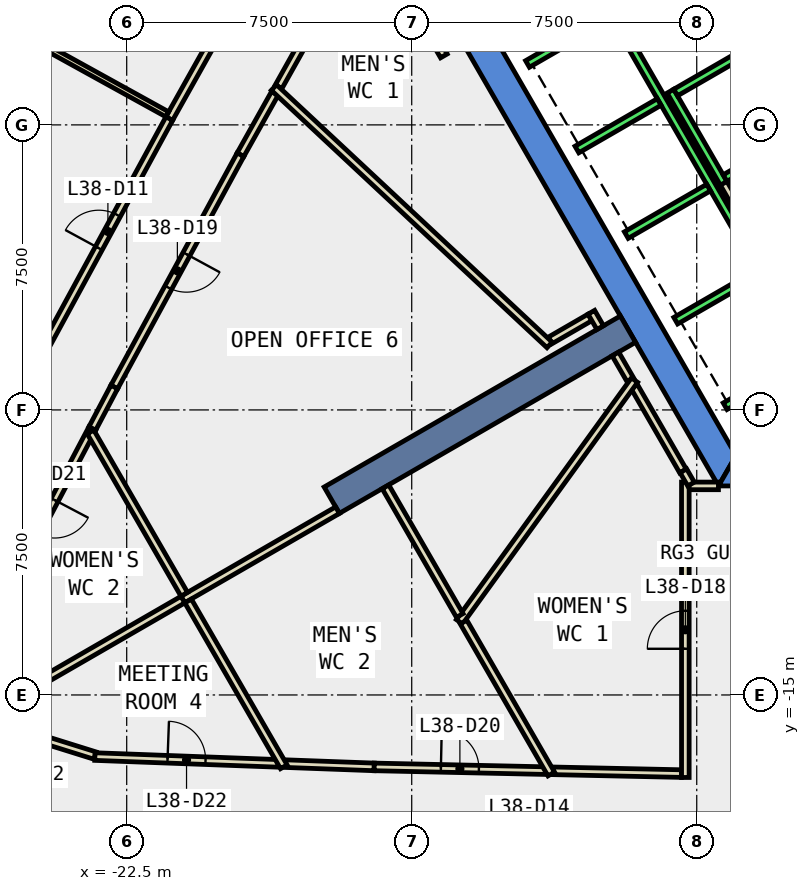
"""IFC4 building model, lengths in metres.
Left out: names, types, materials, properties, quantities, classifications, styles, units other than length and angle.
Written with IfcOpenShell. Run it as: python <this file> out.ifc"""

import sys

from ifc_helpers import new_model, si_unit, direction, frame, frame_2d, origin, place, context, subcontext, project, spatial, polyline, rectangle, outline, extrude, element, fill, save


model = new_model("IFC4")
c1 = context("Model", 3, precision=1e-05, world=origin(), true_north=direction((0.0, 1.0)))
c2 = subcontext(c1, "Body", "Model", "MODEL_VIEW")
j1 = project(units=[si_unit("LENGTHUNIT", "METRE"), si_unit("PLANEANGLEUNIT", "RADIAN")], contexts=[c1])
p1 = place(None, origin())
s1 = spatial("IfcSite", under=j1, at=p1, CompositionType="ELEMENT")
p2 = place(p1, origin())
s2 = spatial("IfcBuilding", under=s1, at=p2, CompositionType="ELEMENT")
p3 = place(p2, frame((0.0, 0.0, 171.8)))
s3 = spatial("IfcBuildingStorey", under=s2, at=p3, CompositionType="ELEMENT", Elevation=171.8)
p4 = place(p3, frame((0.0, 0.0, -0.4)))
e1 = element("IfcWall", 1, at=p4, inside=s3, PredefinedType="SHEAR", context=c2, shape_type="SweptSolid", body=[
    extrude(outline(polyline([(-13.856, 2.5), (-6.928, -9.5), (-6.466, -8.7), (-12.933, 2.5), (-13.856, 2.5)])), origin(), (0.0, 0.0, 1.0), 4.2),
])
p5 = place(p3, frame((0.0, 0.0, -0.4)))
e2 = element("IfcWall", 2, at=p5, inside=s3, PredefinedType="SHEAR", context=c2, shape_type="SweptSolid", body=[
    extrude(outline(polyline([(3.75, -9.5), (3.75, -8.7), (-6.466, -8.7), (-6.928, -9.5), (3.75, -9.5)])), origin(), (0.0, 0.0, 1.0), 4.2),
])
p6 = place(p3, frame((-9.31, -5.375, -0.4), z_axis=(0.0, 0.0, 1.0), x_axis=(-0.866017533419, -0.500013631625, 0.0)))
e3 = element("IfcWall", 3, at=p6, inside=s3, PredefinedType="SHEAR", context=c2, shape_type="SweptSolid", body=[
    extrude(rectangle(XDim=9.0, YDim=0.8, at=frame_2d((4.5, 0.0))), origin(), (0.0, 0.0, 1.0), 4.2),
])
p7 = place(p3, frame((-14.154, 1.815, 0.0), z_axis=(0.0, 0.0, 1.0), x_axis=(-0.500038857296, 0.866002968352, 0.0)))
e4 = element("IfcWall", 4, at=p7, inside=s3, PredefinedType="PARTITIONING", context=c2, shape_type="SweptSolid", body=[
    extrude(rectangle(XDim=3.34, YDim=0.2, at=frame_2d((1.67, 0.0))), origin(), (0.0, 0.0, 1.0), 3.8),
])
p8 = place(p3, frame((-16.255, 5.014, 0.0), z_axis=(0.0, 0.0, 1.0), x_axis=(-0.488988017817, -0.87229050117, 0.0)))
e5 = element("IfcWall", 5, at=p8, inside=s3, PredefinedType="PARTITIONING", context=c2, shape_type="SweptSolid", body=[
    extrude(rectangle(XDim=4.599, YDim=0.2, at=frame_2d((2.3, 0.0))), origin(), (0.0, 0.0, 1.0), 3.8),
])
p9 = place(p8, frame((1.8, 0.0, 0.0)))
e6 = element("IfcOpeningElement", 6, at=p9, cuts=e5, PredefinedType="OPENING", context=c2, shape_type="SweptSolid", body=[
    extrude(rectangle(XDim=1.0, YDim=2.1, at=frame_2d((0.5, 1.05))), frame((0.0, 0.11, 0.0), z_axis=(0.0, -1.0, 0.0), x_axis=(1.0, 0.0, 0.0)), (0.0, 0.0, 1.0), 0.22),
])
p10 = place(p3, frame((-11.278, -16.996, 0.0), z_axis=(0.0, 0.0, 1.0), x_axis=(0.999766613119, -0.021603687022, 0.0)))
e7 = element("IfcWall", 7, at=p10, inside=s3, PredefinedType="PARTITIONING", context=c2, shape_type="SweptSolid", body=[
    extrude(rectangle(XDim=3.379, YDim=0.2, at=frame_2d((1.689, 0.0))), origin(), (0.0, 0.0, 1.0), 3.8),
])
p11 = place(p3, frame((-18.602, 0.828, 0.0), z_axis=(0.0, 0.0, 1.0), x_axis=(-0.488969229043, -0.872301033502, 0.0)))
e8 = element("IfcWall", 8, at=p11, inside=s3, PredefinedType="PARTITIONING", context=c2, shape_type="SweptSolid", body=[
    extrude(rectangle(XDim=1.849, YDim=0.2, at=frame_2d((0.924, 0.0))), origin(), (0.0, 0.0, 1.0), 3.8),
])
p12 = place(p3, frame((-19.506, -0.785, 0.0), z_axis=(0.0, 0.0, 1.0), x_axis=(-0.477513909405, -0.878624189472, 0.0)))
e9 = element("IfcWall", 9, at=p12, inside=s3, PredefinedType="PARTITIONING", context=c2, shape_type="SweptSolid", body=[
    extrude(rectangle(XDim=6.956, YDim=0.2, at=frame_2d((3.478, 0.0))), origin(), (0.0, 0.0, 1.0), 3.8),
])
p13 = place(p12, frame((2.978, 0.0, 0.0)))
e10 = element("IfcOpeningElement", 10, at=p13, cuts=e9, PredefinedType="OPENING", context=c2, shape_type="SweptSolid", body=[
    extrude(rectangle(XDim=1.0, YDim=2.1, at=frame_2d((0.5, 1.05))), frame((0.0, 0.11, 0.0), z_axis=(0.0, -1.0, 0.0), x_axis=(1.0, 0.0, 0.0)), (0.0, 0.0, 1.0), 0.22),
])
p14 = place(p3, frame((-22.828, -6.897, 0.0), z_axis=(0.0, 0.0, 1.0), x_axis=(-0.467225806893, -0.884138023938, 0.0)))
e11 = element("IfcWall", 11, at=p14, inside=s3, PredefinedType="PARTITIONING", context=c2, shape_type="SweptSolid", body=[
    extrude(rectangle(XDim=1.237, YDim=0.2, at=frame_2d((0.619, 0.0))), origin(), (0.0, 0.0, 1.0), 3.8),
])
p15 = place(p3, frame((-18.316, -16.807, 0.0), z_axis=(0.0, 0.0, 1.0), x_axis=(0.999315981353, -0.036980662692, 0.0)))
e12 = element("IfcWall", 12, at=p15, inside=s3, PredefinedType="PARTITIONING", context=c2, shape_type="SweptSolid", body=[
    extrude(rectangle(XDim=2.331, YDim=0.2, at=frame_2d((1.165, 0.0))), origin(), (0.0, 0.0, 1.0), 3.8),
])
p16 = place(p3, frame((-15.987, -16.893, 0.0), z_axis=(0.0, 0.0, 1.0), x_axis=(0.999764376572, -0.021706942174, 0.0)))
e13 = element("IfcWall", 13, at=p16, inside=s3, PredefinedType="PARTITIONING", context=c2, shape_type="SweptSolid", body=[
    extrude(rectangle(XDim=4.51, YDim=0.2, at=frame_2d((2.255, 0.0))), origin(), (0.0, 0.0, 1.0), 3.8),
])
p17 = place(p16, frame((1.755, 0.0, 0.0)))
e14 = element("IfcOpeningElement", 14, at=p17, cuts=e13, PredefinedType="OPENING", context=c2, shape_type="SweptSolid", body=[
    extrude(rectangle(XDim=1.0, YDim=2.1, at=frame_2d((0.5, 1.05))), frame((0.0, 0.11, 0.0), z_axis=(0.0, -1.0, 0.0), x_axis=(1.0, 0.0, 0.0)), (0.0, 0.0, 1.0), 0.22),
])
p18 = place(p3, frame((-23.406, -7.991, 0.0), z_axis=(0.0, 0.0, 1.0), x_axis=(-0.466307932558, -0.884622468646, 0.0)))
e15 = element("IfcWall", 15, at=p18, inside=s3, PredefinedType="PARTITIONING", context=c2, shape_type="SweptSolid", body=[
    extrude(rectangle(XDim=5.25, YDim=0.2, at=frame_2d((2.625, 0.0))), origin(), (0.0, 0.0, 1.0), 3.8),
])
p19 = place(p18, frame((2.125, 0.0, 0.0)))
e16 = element("IfcOpeningElement", 16, at=p19, cuts=e15, PredefinedType="OPENING", context=c2, shape_type="SweptSolid", body=[
    extrude(rectangle(XDim=1.0, YDim=2.1, at=frame_2d((0.5, 1.05))), frame((0.0, 0.11, 0.0), z_axis=(0.0, -1.0, 0.0), x_axis=(1.0, 0.0, 0.0)), (0.0, 0.0, 1.0), 0.22),
])
p20 = place(p3, frame((-25.645, -15.873, 0.0), z_axis=(0.0, 0.0, 1.0), x_axis=(0.95454810771, -0.298056890655, 0.0)))
e17 = element("IfcWall", 17, at=p20, inside=s3, PredefinedType="PARTITIONING", context=c2, shape_type="SweptSolid", body=[
    extrude(rectangle(XDim=2.422, YDim=0.2, at=frame_2d((1.211, 0.0))), origin(), (0.0, 0.0, 1.0), 3.8),
])
p21 = place(p3, frame((-23.337, -16.621, 0.0), z_axis=(0.0, 0.0, 1.0), x_axis=(0.999311710526, -0.037095892019, 0.0)))
e18 = element("IfcWall", 18, at=p21, inside=s3, PredefinedType="PARTITIONING", context=c2, shape_type="SweptSolid", body=[
    extrude(rectangle(XDim=4.824, YDim=0.2, at=frame_2d((2.412, 0.0))), origin(), (0.0, 0.0, 1.0), 3.8),
])
p22 = place(p21, frame((1.913, 0.0, 0.0)))
e19 = element("IfcOpeningElement", 19, at=p22, cuts=e18, PredefinedType="OPENING", context=c2, shape_type="SweptSolid", body=[
    extrude(rectangle(XDim=1.0, YDim=2.1, at=frame_2d((0.5, 1.05))), frame((0.0, 0.11, 0.0), z_axis=(0.0, -1.0, 0.0), x_axis=(1.0, 0.0, 0.0)), (0.0, 0.0, 1.0), 0.22),
])
p23 = place(p3, frame((-21.381, 0.165, 0.0), z_axis=(0.0, 0.0, 1.0), x_axis=(0.489014139272, 0.872275857509, 0.0)))
e20 = element("IfcWall", 20, at=p23, inside=s3, PredefinedType="PARTITIONING", context=c2, shape_type="SweptSolid", body=[
    extrude(rectangle(XDim=7.057, YDim=0.2, at=frame_2d((3.529, 0.0))), origin(), (0.0, 0.0, 1.0), 3.8),
])
p24 = place(p23, frame((3.029, 0.0, 0.0)))
e21 = element("IfcOpeningElement", 21, at=p24, cuts=e20, PredefinedType="OPENING", context=c2, shape_type="SweptSolid", body=[
    extrude(rectangle(XDim=1.0, YDim=2.1, at=frame_2d((0.5, 1.05))), frame((0.0, 0.11, 0.0), z_axis=(0.0, -1.0, 0.0), x_axis=(1.0, 0.0, 0.0)), (0.0, 0.0, 1.0), 0.22),
])
p25 = place(p3, frame((-24.68, -5.906, 0.0), z_axis=(0.0, 0.0, 1.0), x_axis=(0.47757676389, 0.878590026459, 0.0)))
e22 = element("IfcWall", 22, at=p25, inside=s3, PredefinedType="PARTITIONING", context=c2, shape_type="SweptSolid", body=[
    extrude(rectangle(XDim=6.91, YDim=0.2, at=frame_2d((3.455, 0.0))), origin(), (0.0, 0.0, 1.0), 3.8),
])
p26 = place(p25, frame((3.029, 0.0, 0.0)))
e23 = element("IfcOpeningElement", 23, at=p26, cuts=e22, PredefinedType="OPENING", context=c2, shape_type="SweptSolid", body=[
    extrude(rectangle(XDim=1.0, YDim=2.1, at=frame_2d((0.5, 1.05))), frame((0.0, 0.11, 0.0), z_axis=(0.0, -1.0, 0.0), x_axis=(1.0, 0.0, 0.0)), (0.0, 0.0, 1.0), 0.22),
])
p27 = place(p3, frame((-23.691, -18.683, 0.0), z_axis=(0.0, 0.0, 1.0), x_axis=(-0.954546657381, 0.298061535398, 0.0)))
e24 = element("IfcWall", 24, at=p27, inside=s3, PredefinedType="PARTITIONING", context=c2, shape_type="SweptSolid", body=[
    extrude(rectangle(XDim=3.191, YDim=0.2, at=frame_2d((1.596, 0.0))), origin(), (0.0, 0.0, 1.0), 3.8),
])
p28 = place(p27, frame((1.096, 0.0, 0.0)))
e25 = element("IfcOpeningElement", 25, at=p28, cuts=e24, PredefinedType="OPENING", context=c2, shape_type="SweptSolid", body=[
    extrude(rectangle(XDim=1.0, YDim=2.1, at=frame_2d((0.5, 1.05))), frame((0.0, 0.11, 0.0), z_axis=(0.0, -1.0, 0.0), x_axis=(1.0, 0.0, 0.0)), (0.0, 0.0, 1.0), 0.22),
])
p29 = place(p3, frame((-5.492, -3.788, 0.0), z_axis=(0.0, 0.0, 1.0), x_axis=(-0.500008949224, 0.866020236886, 0.0)))
e26 = element("IfcWall", 26, at=p29, inside=s3, PredefinedType="PARTITIONING", context=c2, shape_type="SweptSolid", body=[
    extrude(rectangle(XDim=2.68, YDim=0.2, at=frame_2d((1.34, 0.0))), origin(), (0.0, 0.0, 1.0), 3.8),
])
p30 = place(p3, frame((-7.722, -9.499, 0.0), z_axis=(0.0, 0.0, 1.0), x_axis=(1.0, 0.0, 0.0)))
e27 = element("IfcWall", 27, at=p30, inside=s3, PredefinedType="PARTITIONING", context=c2, shape_type="SweptSolid", body=[
    extrude(rectangle(XDim=0.793, YDim=0.2, at=frame_2d((0.396, 0.0))), origin(), (0.0, 0.0, 1.0), 3.8),
])
p31 = place(p3, frame((-7.8, -17.171, 0.0), z_axis=(0.0, 0.0, 1.0), x_axis=(0.0, 1.0, 0.0)))
e28 = element("IfcWall", 28, at=p31, inside=s3, PredefinedType="PARTITIONING", context=c2, shape_type="SweptSolid", body=[
    extrude(rectangle(XDim=7.772, YDim=0.2, at=frame_2d((3.886, 0.0))), origin(), (0.0, 0.0, 1.0), 3.8),
])
p32 = place(p31, frame((3.386, 0.0, 0.0)))
e29 = element("IfcOpeningElement", 29, at=p32, cuts=e28, PredefinedType="OPENING", context=c2, shape_type="SweptSolid", body=[
    extrude(rectangle(XDim=1.0, YDim=2.1, at=frame_2d((0.5, 1.05))), frame((0.0, 0.11, 0.0), z_axis=(0.0, -1.0, 0.0), x_axis=(1.0, 0.0, 0.0)), (0.0, 0.0, 1.0), 0.22),
])
p33 = place(p3, frame((-7.862, -9.107, 0.0), z_axis=(0.0, 0.0, 1.0), x_axis=(-0.499994038704, 0.866028845513, 0.0)))
e30 = element("IfcWall", 30, at=p33, inside=s3, PredefinedType="PARTITIONING", context=c2, shape_type="SweptSolid", body=[
    extrude(rectangle(XDim=2.568, YDim=0.2, at=frame_2d((1.284, 0.0))), origin(), (0.0, 0.0, 1.0), 3.8),
])
p34 = place(p3, frame((-7.65, -9.451, 0.0), z_axis=(0.0, 0.0, 1.0), x_axis=(-0.500297731093, 0.865853440406, 0.0)))
e31 = element("IfcWall", 31, at=p34, inside=s3, PredefinedType="PARTITIONING", context=c2, shape_type="SweptSolid", body=[
    extrude(rectangle(XDim=0.404, YDim=0.2, at=frame_2d((0.202, 0.0))), origin(), (0.0, 0.0, 1.0), 3.8),
])
p35 = place(p3, frame((-9.246, -6.71, 0.0), z_axis=(0.0, 0.0, 1.0), x_axis=(-0.499570510076, 0.86627322795, 0.0)))
e32 = element("IfcWall", 32, at=p35, inside=s3, PredefinedType="PARTITIONING", context=c2, shape_type="SweptSolid", body=[
    extrude(rectangle(XDim=0.788, YDim=0.2, at=frame_2d((0.394, 0.0))), origin(), (0.0, 0.0, 1.0), 3.8),
])
p36 = place(p3, frame((-10.31, -5.066, 0.0), z_axis=(0.0, 0.0, 1.0), x_axis=(-0.865587329375, -0.500758000661, 0.0)))
e33 = element("IfcWall", 33, at=p36, inside=s3, PredefinedType="PARTITIONING", context=c2, shape_type="SweptSolid", body=[
    extrude(rectangle(XDim=1.21, YDim=0.2, at=frame_2d((0.605, 0.0))), origin(), (0.0, 0.0, 1.0), 3.8),
])
p37 = place(p3, frame((-11.372, -5.79, 0.0), z_axis=(0.0, 0.0, 1.0), x_axis=(-0.730922728623, 0.682460229451, 0.0)))
e34 = element("IfcWall", 34, at=p37, inside=s3, PredefinedType="PARTITIONING", context=c2, shape_type="SweptSolid", body=[
    extrude(rectangle(XDim=9.924, YDim=0.2, at=frame_2d((4.962, 0.0))), origin(), (0.0, 0.0, 1.0), 3.8),
])
p38 = place(p3, frame((-13.744, -13.076, 0.0), z_axis=(0.0, 0.0, 1.0), x_axis=(0.586577314901, 0.809893235953, 0.0)))
e35 = element("IfcWall", 35, at=p38, inside=s3, PredefinedType="PARTITIONING", context=c2, shape_type="SweptSolid", body=[
    extrude(rectangle(XDim=7.854, YDim=0.2, at=frame_2d((3.927, 0.0))), origin(), (0.0, 0.0, 1.0), 3.8),
])
p39 = place(p3, frame((-11.328, -17.08, 0.0), z_axis=(0.0, 0.0, 1.0), x_axis=(-0.499972710878, 0.866041158593, 0.0)))
e36 = element("IfcWall", 36, at=p39, inside=s3, PredefinedType="PARTITIONING", context=c2, shape_type="SweptSolid", body=[
    extrude(rectangle(XDim=4.616, YDim=0.2, at=frame_2d((2.308, 0.0))), origin(), (0.0, 0.0, 1.0), 3.8),
])
p40 = place(p3, frame((-13.736, -12.909, 0.0), z_axis=(0.0, 0.0, 1.0), x_axis=(-0.49990810406, 0.866078453429, 0.0)))
e37 = element("IfcWall", 37, at=p40, inside=s3, PredefinedType="PARTITIONING", context=c2, shape_type="SweptSolid", body=[
    extrude(rectangle(XDim=3.908, YDim=0.2, at=frame_2d((1.954, 0.0))), origin(), (0.0, 0.0, 1.0), 3.8),
])
p41 = place(p3, frame((-16.952, -10.138, 0.0), z_axis=(0.0, 0.0, 1.0), x_axis=(-0.866054992606, -0.499948747156, 0.0)))
e38 = element("IfcWall", 38, at=p41, inside=s3, PredefinedType="PARTITIONING", context=c2, shape_type="SweptSolid", body=[
    extrude(rectangle(XDim=4.701, YDim=0.2, at=frame_2d((2.35, 0.0))), origin(), (0.0, 0.0, 1.0), 3.8),
])
p42 = place(p3, frame((-20.986, -12.351, 0.0), z_axis=(0.0, 0.0, 1.0), x_axis=(-0.499993851206, 0.866028953763, 0.0)))
e39 = element("IfcWall", 39, at=p42, inside=s3, PredefinedType="PARTITIONING", context=c2, shape_type="SweptSolid", body=[
    extrude(rectangle(XDim=4.932, YDim=0.2, at=frame_2d((2.466, 0.0))), origin(), (0.0, 0.0, 1.0), 3.8),
])
p43 = place(p3, frame((-18.366, -16.89, 0.0), z_axis=(0.0, 0.0, 1.0), x_axis=(-0.499965828395, 0.866045131871, 0.0)))
e40 = element("IfcWall", 40, at=p43, inside=s3, PredefinedType="PARTITIONING", context=c2, shape_type="SweptSolid", body=[
    extrude(rectangle(XDim=5.036, YDim=0.2, at=frame_2d((2.518, 0.0))), origin(), (0.0, 0.0, 1.0), 3.8),
])
p44 = place(p3, frame((-21.021, -12.491, 0.0), z_axis=(0.0, 0.0, 1.0), x_axis=(-0.865966890845, -0.500101333692, 0.0)))
e41 = element("IfcWall", 41, at=p44, inside=s3, PredefinedType="PARTITIONING", context=c2, shape_type="SweptSolid", body=[
    extrude(rectangle(XDim=5.931, YDim=0.2, at=frame_2d((2.965, 0.0))), origin(), (0.0, 0.0, 1.0), 3.8),
])
p45 = place(p3, frame((-21.432, 0.278, 0.0), z_axis=(0.0, 0.0, 1.0), x_axis=(-0.875412579047, 0.483376474857, 0.0)))
e42 = element("IfcWall", 42, at=p45, inside=s3, PredefinedType="PARTITIONING", context=c2, shape_type="SweptSolid", body=[
    extrude(rectangle(XDim=4.531, YDim=0.15, at=frame_2d((2.265, 0.0))), origin(), (0.0, 0.0, 1.0), 3.8),
])
p46 = place(p3, frame((-10.04, -5.334, 0.0), z_axis=(0.0, 0.0, 1.0), x_axis=(-0.499405191234, 0.86636854454, 0.0)))
e43 = element("IfcWall", 43, at=p46, inside=s3, PredefinedType="PARTITIONING", context=c2, shape_type="SweptSolid", body=[
    extrude(rectangle(XDim=0.466, YDim=0.2, at=frame_2d((0.233, 0.0))), origin(), (0.0, 0.0, 1.0), 3.8),
])
p47 = place(p3, frame((-8.192, 0.888, 0.0), z_axis=(0.0, 0.0, 1.0), x_axis=(0.49994636267, -0.866056369097, 0.0)))
e44 = element("IfcWall", 44, at=p47, inside=s3, PredefinedType="STANDARD", context=c2, shape_type="SweptSolid", body=[
    extrude(rectangle(XDim=2.8, YDim=0.2, at=frame_2d((1.4, 0.0))), origin(), (0.0, 0.0, 1.0), 3.8),
])
for number, where, z_axis, x_axis in (
    (45, (-5.977, 2.052, 0.0), (0.0, 0.0, 1.0), (-0.866, -0.5, 0.0)),
    (46, (-4.677, -0.2, 0.0), (0.0, 0.0, 1.0), (-0.866, -0.5, 0.0)),
):
    element("IfcWall", number, at=place(p3, frame(where, z_axis=z_axis, x_axis=x_axis)), inside=s3, PredefinedType="STANDARD", context=c2, shape_type="SweptSolid", body=[
        extrude(rectangle(XDim=2.399, YDim=0.2, at=frame_2d((1.2, 0.0))), origin(), (0.0, 0.0, 1.0), 3.8),
    ])
p48 = place(p3, frame((-9.751, 2.99, 0.0), z_axis=(0.0, 0.0, 1.0), x_axis=(0.50000090737, -0.866024879913, 0.0)))
e47 = element("IfcWall", 47, at=p48, inside=s3, PredefinedType="STANDARD", context=c2, shape_type="SweptSolid", body=[
    extrude(rectangle(XDim=10.6, YDim=0.2, at=frame_2d((5.3, 0.0))), origin(), (0.0, 0.0, 1.0), 3.8),
])
p49 = place(p3, frame((-9.788, 2.853, 0.0), z_axis=(0.0, 0.0, 1.0), x_axis=(-0.865998541277, -0.500046524342, 0.0)))
e48 = element("IfcWall", 48, at=p49, inside=s3, PredefinedType="STANDARD", context=c2, shape_type="SweptSolid", body=[
    extrude(rectangle(XDim=2.5, YDim=0.2, at=frame_2d((1.25, 0.0))), origin(), (0.0, 0.0, 1.0), 3.8),
])
for number, where, z_axis, x_axis in (
    (49, (-8.488, 0.602, 0.0), (0.0, 0.0, 1.0), (-0.866, -0.5, 0.0)),
    (50, (-7.188, -1.65, 0.0), (0.0, 0.0, 1.0), (-0.866, -0.5, 0.0)),
    (51, (-5.888, -3.902, 0.0), (0.0, 0.0, 1.0), (-0.866, -0.5, 0.0)),
    (52, (-4.588, -6.153, 0.0), (0.0, 0.0, 1.0), (-0.866, -0.5, 0.0)),
):
    element("IfcWall", number, at=place(p3, frame(where, z_axis=z_axis, x_axis=x_axis)), inside=s3, PredefinedType="STANDARD", context=c2, shape_type="SweptSolid", body=[
        extrude(rectangle(XDim=2.5, YDim=0.2, at=frame_2d((1.25, 0.0))), origin(), (0.0, 0.0, 1.0), 3.8),
    ])
p50 = place(p26, origin())
e53 = element("IfcDoor", 53, at=p50, inside=s3, OperationType="SINGLE_SWING_LEFT", PredefinedType="DOOR", context=c2, shape_type="SweptSolid", body=[
    extrude(rectangle(XDim=1.0, YDim=2.1, at=frame_2d((0.5, 1.05))), frame((0.0, 0.025, 0.0), z_axis=(0.0, -1.0, 0.0), x_axis=(1.0, 0.0, 0.0)), (0.0, 0.0, 1.0), 0.05),
])
fill(e23, e53)
p51 = place(p32, origin())
e54 = element("IfcDoor", 54, at=p51, inside=s3, OperationType="SINGLE_SWING_LEFT", PredefinedType="DOOR", context=c2, shape_type="SweptSolid", body=[
    extrude(rectangle(XDim=1.0, YDim=2.1, at=frame_2d((0.5, 1.05))), frame((0.0, 0.025, 0.0), z_axis=(0.0, -1.0, 0.0), x_axis=(1.0, 0.0, 0.0)), (0.0, 0.0, 1.0), 0.05),
])
fill(e29, e54)
p52 = place(p13, origin())
e55 = element("IfcDoor", 55, at=p52, inside=s3, OperationType="SINGLE_SWING_LEFT", PredefinedType="DOOR", context=c2, shape_type="SweptSolid", body=[
    extrude(rectangle(XDim=1.0, YDim=2.1, at=frame_2d((0.5, 1.05))), frame((0.0, 0.025, 0.0), z_axis=(0.0, -1.0, 0.0), x_axis=(1.0, 0.0, 0.0)), (0.0, 0.0, 1.0), 0.05),
])
fill(e10, e55)
p53 = place(p17, origin())
e56 = element("IfcDoor", 56, at=p53, inside=s3, OperationType="SINGLE_SWING_LEFT", PredefinedType="DOOR", context=c2, shape_type="SweptSolid", body=[
    extrude(rectangle(XDim=1.0, YDim=2.1, at=frame_2d((0.5, 1.05))), frame((0.0, 0.025, 0.0), z_axis=(0.0, -1.0, 0.0), x_axis=(1.0, 0.0, 0.0)), (0.0, 0.0, 1.0), 0.05),
])
fill(e14, e56)
p54 = place(p19, origin())
e57 = element("IfcDoor", 57, at=p54, inside=s3, OperationType="SINGLE_SWING_LEFT", PredefinedType="DOOR", context=c2, shape_type="SweptSolid", body=[
    extrude(rectangle(XDim=1.0, YDim=2.1, at=frame_2d((0.5, 1.05))), frame((0.0, 0.025, 0.0), z_axis=(0.0, -1.0, 0.0), x_axis=(1.0, 0.0, 0.0)), (0.0, 0.0, 1.0), 0.05),
])
fill(e16, e57)
p55 = place(p22, origin())
e58 = element("IfcDoor", 58, at=p55, inside=s3, OperationType="SINGLE_SWING_LEFT", PredefinedType="DOOR", context=c2, shape_type="SweptSolid", body=[
    extrude(rectangle(XDim=1.0, YDim=2.1, at=frame_2d((0.5, 1.05))), frame((0.0, 0.025, 0.0), z_axis=(0.0, -1.0, 0.0), x_axis=(1.0, 0.0, 0.0)), (0.0, 0.0, 1.0), 0.05),
])
fill(e19, e58)
save(model, sys.argv[1])
